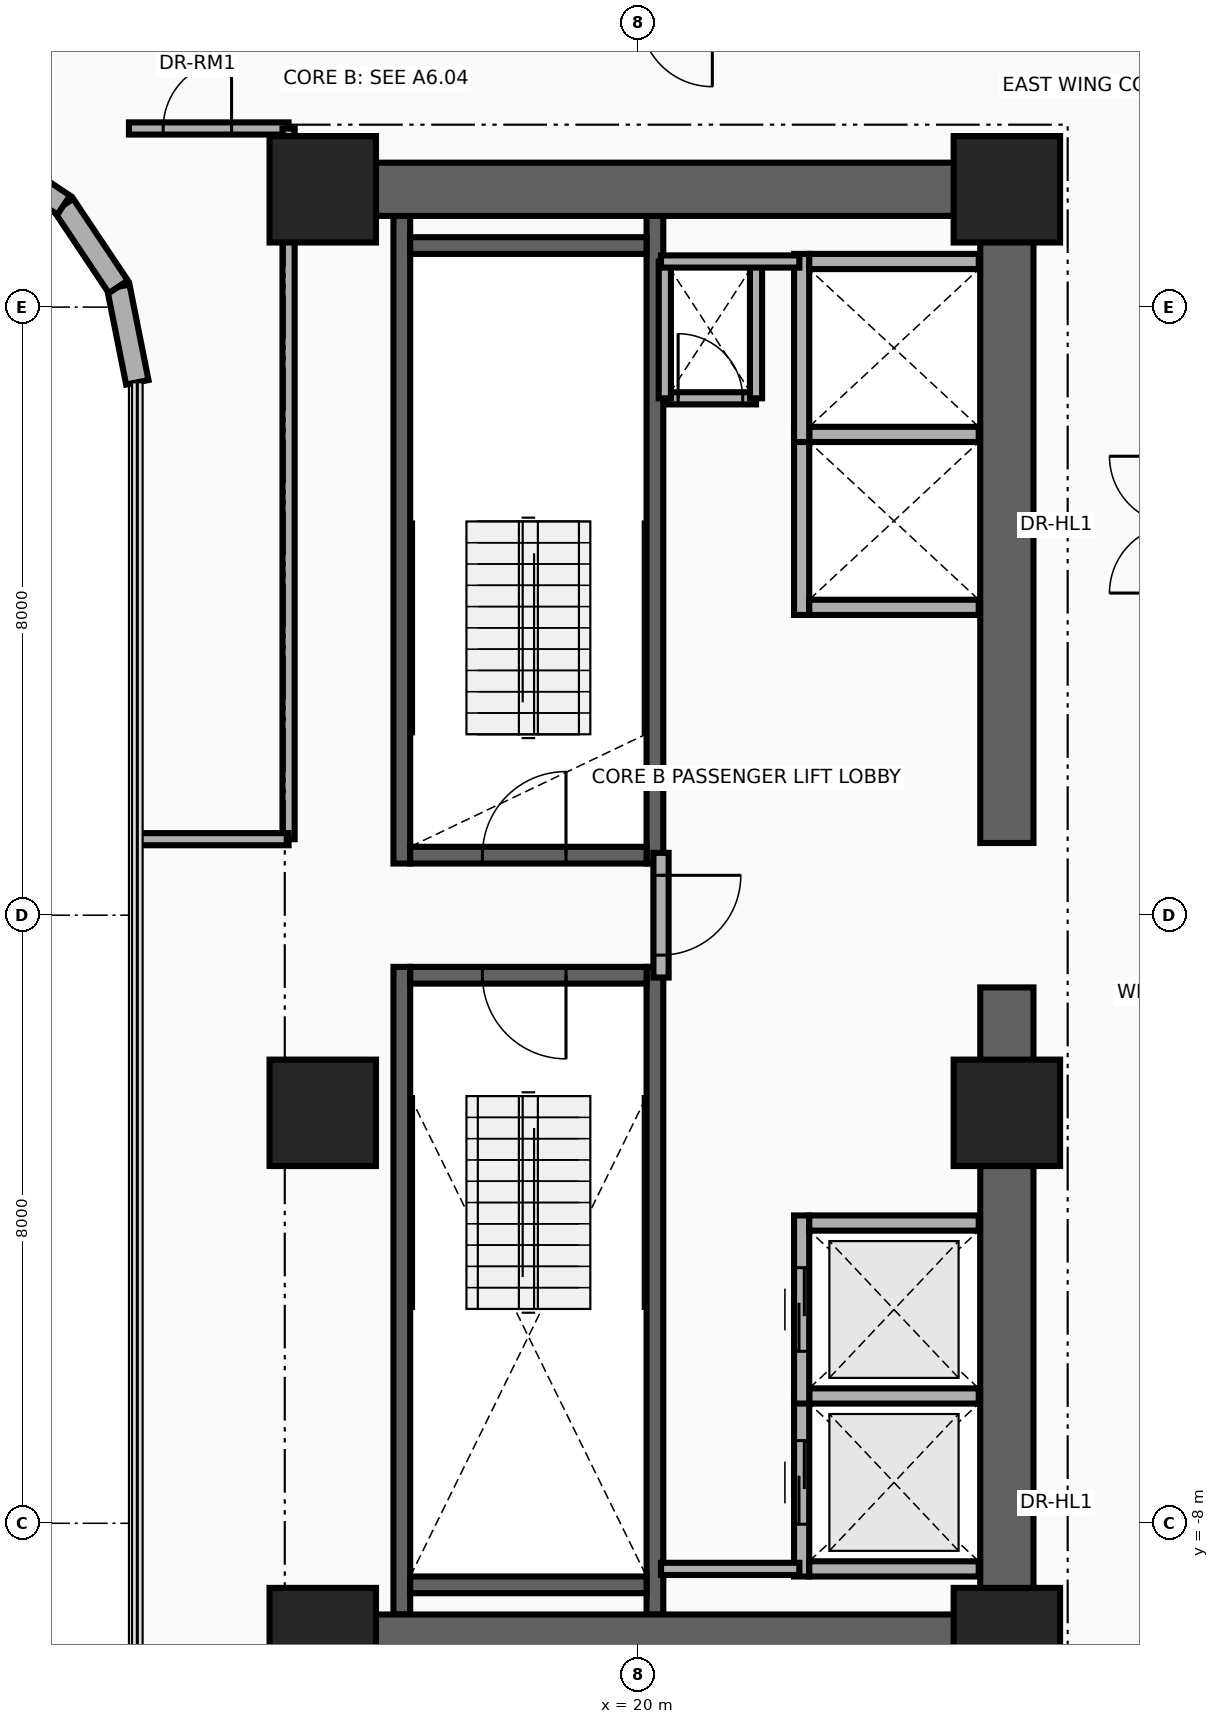
"""IFC4 building model, lengths in metres.
Left out: names, types, materials, properties, quantities, classifications, styles, units other than length and angle.
Written with IfcOpenShell. Run it as: python <this file> out.ifc"""

import sys

from ifc_helpers import new_model, si_unit, direction, frame, frame_2d, origin, origin_2d, place, context, subcontext, project, spatial, rectangle, extrude, source, transform, mapped, element, fill, save


model = new_model("IFC4")
c1 = context("Model", 3, precision=1e-05, world=origin(), true_north=direction((0.0, 1.0)))
c2 = subcontext(c1, "Body", "Model", "MODEL_VIEW")
j1 = project(units=[si_unit("LENGTHUNIT", "METRE"), si_unit("PLANEANGLEUNIT", "RADIAN")], contexts=[c1])
p1 = place(None, origin())
s1 = spatial("IfcSite", under=j1, at=p1, CompositionType="ELEMENT")
p2 = place(p1, origin())
s2 = spatial("IfcBuilding", under=s1, at=p2, CompositionType="ELEMENT")
p3 = place(p2, frame((0.0, 0.0, 92.6)))
s3 = spatial("IfcBuildingStorey", under=s2, at=p3, CompositionType="ELEMENT", Elevation=92.6)
for number, where, z_axis, x_axis in (
    (1, (16.89, 0.68, 0.0), (0.0, 0.0, 1.0), (0.0, 1.0, 0.0)),
    (2, (20.22, 0.68, 0.0), (0.0, 0.0, 1.0), (0.0, 1.0, 0.0)),
):
    element("IfcWall", number, at=place(p3, frame(where, z_axis=z_axis, x_axis=x_axis)), inside=s3, PredefinedType="SHEAR", context=c2, shape_type="SweptSolid", body=[
        extrude(rectangle(XDim=8.52, YDim=0.22, at=frame_2d((4.26, 0.0))), origin(), (0.0, 0.0, 1.0), 3.46),
    ])
p4 = place(p3, frame((17.0, 0.79, 0.0), z_axis=(0.0, 0.0, 1.0), x_axis=(1.0, 0.0, 0.0)))
e3 = element("IfcWall", 3, at=p4, inside=s3, PredefinedType="SHEAR", context=c2, shape_type="SweptSolid", body=[
    extrude(rectangle(XDim=3.11, YDim=0.22, at=frame_2d((1.555, 0.0))), origin(), (0.0, 0.0, 1.0), 3.46),
])
p5 = place(p4, frame((0.95, 0.0, 0.0)))
e4 = element("IfcOpeningElement", 4, at=p5, cuts=e3, PredefinedType="OPENING", context=c2, shape_type="SweptSolid", body=[
    extrude(rectangle(XDim=1.1, YDim=2.15, at=frame_2d((0.55, 1.075))), frame((0.0, 0.125, 0.0), z_axis=(0.0, -1.0, 0.0), x_axis=(1.0, 0.0, 0.0)), (0.0, 0.0, 1.0), 0.25),
])
p6 = place(p3, frame((17.0, 8.81, 0.0), z_axis=(0.0, 0.0, 1.0), x_axis=(1.0, 0.0, 0.0)))
e5 = element("IfcWall", 5, at=p6, inside=s3, PredefinedType="SHEAR", context=c2, shape_type="SweptSolid", body=[
    extrude(rectangle(XDim=3.11, YDim=0.22, at=frame_2d((1.555, 0.0))), origin(), (0.0, 0.0, 1.0), 3.46),
])
for number, where, z_axis, x_axis in (
    (6, (16.89, -9.2, 0.0), (0.0, 0.0, 1.0), (0.0, 1.0, 0.0)),
    (7, (20.22, -9.2, 0.0), (0.0, 0.0, 1.0), (0.0, 1.0, 0.0)),
):
    element("IfcWall", number, at=place(p3, frame(where, z_axis=z_axis, x_axis=x_axis)), inside=s3, PredefinedType="SHEAR", context=c2, shape_type="SweptSolid", body=[
        extrude(rectangle(XDim=8.52, YDim=0.22, at=frame_2d((4.26, 0.0))), origin(), (0.0, 0.0, 1.0), 3.46),
    ])
p7 = place(p3, frame((17.0, -8.81, 0.0), z_axis=(0.0, 0.0, 1.0), x_axis=(1.0, 0.0, 0.0)))
e8 = element("IfcWall", 8, at=p7, inside=s3, PredefinedType="SHEAR", context=c2, shape_type="SweptSolid", body=[
    extrude(rectangle(XDim=3.11, YDim=0.22, at=frame_2d((1.555, 0.0))), origin(), (0.0, 0.0, 1.0), 3.46),
])
p8 = place(p3, frame((17.0, -0.79, 0.0), z_axis=(0.0, 0.0, 1.0), x_axis=(1.0, 0.0, 0.0)))
e9 = element("IfcWall", 9, at=p8, inside=s3, PredefinedType="SHEAR", context=c2, shape_type="SweptSolid", body=[
    extrude(rectangle(XDim=3.11, YDim=0.22, at=frame_2d((1.555, 0.0))), origin(), (0.0, 0.0, 1.0), 3.46),
])
p9 = place(p8, frame((0.95, 0.0, 0.0)))
e10 = element("IfcOpeningElement", 10, at=p9, cuts=e9, PredefinedType="OPENING", context=c2, shape_type="SweptSolid", body=[
    extrude(rectangle(XDim=1.1, YDim=2.15, at=frame_2d((0.55, 1.075))), frame((0.0, 0.125, 0.0), z_axis=(0.0, -1.0, 0.0), x_axis=(1.0, 0.0, 0.0)), (0.0, 0.0, 1.0), 0.25),
])
for number, where, z_axis, x_axis in (
    (11, (24.85, -9.9, 0.0), (0.0, 0.0, 1.0), (0.0, 1.0, 0.0)),
    (12, (24.85, 0.95, 0.0), (0.0, 0.0, 1.0), (0.0, 1.0, 0.0)),
):
    element("IfcWall", number, at=place(p3, frame(where, z_axis=z_axis, x_axis=x_axis)), inside=s3, PredefinedType="SHEAR", context=c2, shape_type="SweptSolid", body=[
        extrude(rectangle(XDim=8.95, YDim=0.7, at=frame_2d((4.475, 0.0))), origin(), (0.0, 0.0, 1.0), 3.46),
    ])
for number, where, z_axis, x_axis in (
    (13, (15.85, 9.55, 0.0), (0.0, 0.0, 1.0), (1.0, 0.0, 0.0)),
    (14, (15.85, -9.55, 0.0), (0.0, 0.0, 1.0), (1.0, 0.0, 0.0)),
):
    element("IfcWall", number, at=place(p3, frame(where, z_axis=z_axis, x_axis=x_axis)), inside=s3, PredefinedType="SHEAR", context=c2, shape_type="SweptSolid", body=[
        extrude(rectangle(XDim=9.0, YDim=0.7, at=frame_2d((4.5, 0.0))), origin(), (0.0, 0.0, 1.0), 3.46),
    ])
m1 = source(origin(), c2, "Body", "SweptSolid", [
    extrude(rectangle(XDim=1.4, YDim=1.4, at=origin_2d()), origin(), (0.0, 0.0, 1.0), 3.7),
])
for number, where, z_axis, x_axis in (
    (15, (15.85, -9.55, 0.0), (0.0, 0.0, 1.0), (1.0, 0.0, 0.0)),
    (16, (24.85, -9.55, 0.0), (0.0, 0.0, 1.0), (1.0, 0.0, 0.0)),
    (17, (15.85, -2.6, 0.0), (0.0, 0.0, 1.0), (1.0, 0.0, 0.0)),
    (18, (24.85, -2.6, 0.0), (0.0, 0.0, 1.0), (1.0, 0.0, 0.0)),
    (19, (15.85, 9.55, 0.0), (0.0, 0.0, 1.0), (1.0, 0.0, 0.0)),
    (20, (24.85, 9.55, 0.0), (0.0, 0.0, 1.0), (1.0, 0.0, 0.0)),
):
    element("IfcColumn", number, at=place(p3, frame(where, z_axis=z_axis, x_axis=x_axis)), inside=s3, PredefinedType="COLUMN", context=c2, shape_type="MappedRepresentation", body=[
        mapped(m1, transform((0.0, 0.0, 0.0), x_axis=(1.0, 0.0, 0.0), y_axis=(0.0, 1.0, 0.0), z_axis=(0.0, 0.0, 1.0), scale=1.0)),
    ])
p10 = place(p3, frame((13.41, 7.011, 0.0), z_axis=(0.0, 0.0, 1.0), x_axis=(-0.195090163074, 0.980785312019, 0.0)))
e21 = element("IfcWall", 21, at=p10, inside=s3, PredefinedType="SOLIDWALL", context=c2, shape_type="SweptSolid", body=[
    extrude(rectangle(XDim=1.281, YDim=0.3, at=frame_2d((0.641, 0.0))), origin(), (0.0, 0.0, 1.0), 3.46),
])
for number, where, z_axis, x_axis in (
    (22, (13.16, 8.268, 0.0), (0.0, 0.0, 1.0), (-0.556, 0.831, 0.0)),
    (23, (12.442, 9.342, 0.0), (0.0, 0.0, 1.0), (-0.831, 0.556, 0.0)),
):
    element("IfcWall", number, at=place(p3, frame(where, z_axis=z_axis, x_axis=x_axis)), inside=s3, PredefinedType="SOLIDWALL", context=c2, shape_type="SweptSolid", body=[
        extrude(rectangle(XDim=1.292, YDim=0.3, at=frame_2d((0.646, 0.0))), origin(), (0.0, 0.0, 1.0), 3.46),
    ])
p11 = place(p3, frame((22.15, -8.7, 0.0), z_axis=(0.0, 0.0, 1.0), x_axis=(0.0, 1.0, 0.0)))
e24 = element("IfcWall", 24, at=p11, inside=s3, PredefinedType="MOVABLE", context=c2, shape_type="SweptSolid", body=[
    extrude(rectangle(XDim=2.475, YDim=0.2, at=frame_2d((1.237, 0.0))), origin(), (0.0, 0.0, 1.0), 3.46),
])
p12 = place(p11, frame((0.688, 0.0, 0.0)))
e25 = element("IfcOpeningElement", 25, at=p12, cuts=e24, PredefinedType="OPENING", context=c2, shape_type="SweptSolid", body=[
    extrude(rectangle(XDim=1.1, YDim=2.1, at=frame_2d((0.55, 1.05))), frame((0.0, 0.115, 0.0), z_axis=(0.0, -1.0, 0.0), x_axis=(1.0, 0.0, 0.0)), (0.0, 0.0, 1.0), 0.23),
])
for number, where, z_axis, x_axis in (
    (26, (22.25, -8.6, 0.0), (0.0, 0.0, 1.0), (1.0, 0.0, 0.0)),
    (27, (22.25, -6.325, 0.0), (0.0, 0.0, 1.0), (1.0, 0.0, 0.0)),
):
    element("IfcWall", number, at=place(p3, frame(where, z_axis=z_axis, x_axis=x_axis)), inside=s3, PredefinedType="MOVABLE", context=c2, shape_type="SweptSolid", body=[
        extrude(rectangle(XDim=2.23, YDim=0.2, at=frame_2d((1.115, 0.0))), origin(), (0.0, 0.0, 1.0), 3.46),
    ])
p13 = place(p3, frame((22.15, -6.425, 0.0), z_axis=(0.0, 0.0, 1.0), x_axis=(0.0, 1.0, 0.0)))
e28 = element("IfcWall", 28, at=p13, inside=s3, PredefinedType="MOVABLE", context=c2, shape_type="SweptSolid", body=[
    extrude(rectangle(XDim=2.475, YDim=0.2, at=frame_2d((1.238, 0.0))), origin(), (0.0, 0.0, 1.0), 3.46),
])
p14 = place(p13, frame((0.688, 0.0, 0.0)))
e29 = element("IfcOpeningElement", 29, at=p14, cuts=e28, PredefinedType="OPENING", context=c2, shape_type="SweptSolid", body=[
    extrude(rectangle(XDim=1.1, YDim=2.1, at=frame_2d((0.55, 1.05))), frame((0.0, 0.115, 0.0), z_axis=(0.0, -1.0, 0.0), x_axis=(1.0, 0.0, 0.0)), (0.0, 0.0, 1.0), 0.23),
])
p15 = place(p3, frame((22.25, -4.05, 0.0), z_axis=(0.0, 0.0, 1.0), x_axis=(1.0, 0.0, 0.0)))
e30 = element("IfcWall", 30, at=p15, inside=s3, PredefinedType="MOVABLE", context=c2, shape_type="SweptSolid", body=[
    extrude(rectangle(XDim=2.23, YDim=0.2, at=frame_2d((1.115, 0.0))), origin(), (0.0, 0.0, 1.0), 3.46),
])
p16 = place(p3, frame((22.15, 3.95, 0.0), z_axis=(0.0, 0.0, 1.0), x_axis=(0.0, 1.0, 0.0)))
e31 = element("IfcWall", 31, at=p16, inside=s3, PredefinedType="MOVABLE", context=c2, shape_type="SweptSolid", body=[
    extrude(rectangle(XDim=2.475, YDim=0.2, at=frame_2d((1.238, 0.0))), origin(), (0.0, 0.0, 1.0), 3.46),
])
for number, where, z_axis, x_axis in (
    (32, (22.25, 4.05, 0.0), (0.0, 0.0, 1.0), (1.0, 0.0, 0.0)),
    (33, (22.25, 6.325, 0.0), (0.0, 0.0, 1.0), (1.0, 0.0, 0.0)),
):
    element("IfcWall", number, at=place(p3, frame(where, z_axis=z_axis, x_axis=x_axis)), inside=s3, PredefinedType="MOVABLE", context=c2, shape_type="SweptSolid", body=[
        extrude(rectangle(XDim=2.23, YDim=0.2, at=frame_2d((1.115, 0.0))), origin(), (0.0, 0.0, 1.0), 2.245),
    ])
p17 = place(p3, frame((22.15, 6.225, 0.0), z_axis=(0.0, 0.0, 1.0), x_axis=(0.0, 1.0, 0.0)))
e34 = element("IfcWall", 34, at=p17, inside=s3, PredefinedType="MOVABLE", context=c2, shape_type="SweptSolid", body=[
    extrude(rectangle(XDim=2.475, YDim=0.2, at=frame_2d((1.237, 0.0))), origin(), (0.0, 0.0, 1.0), 3.46),
])
p18 = place(p3, frame((22.25, 8.6, 0.0), z_axis=(0.0, 0.0, 1.0), x_axis=(1.0, 0.0, 0.0)))
e35 = element("IfcWall", 35, at=p18, inside=s3, PredefinedType="MOVABLE", context=c2, shape_type="SweptSolid", body=[
    extrude(rectangle(XDim=2.23, YDim=0.2, at=frame_2d((1.115, 0.0))), origin(), (0.0, 0.0, 1.0), 2.245),
])
p19 = place(p3, frame((20.3, -0.82, 0.0), z_axis=(0.0, 0.0, 1.0), x_axis=(0.0, 1.0, 0.0)))
e36 = element("IfcWall", 36, at=p19, inside=s3, PredefinedType="PARTITIONING", context=c2, shape_type="SweptSolid", body=[
    extrude(rectangle(XDim=1.64, YDim=0.2, at=frame_2d((0.82, 0.0))), origin(), (0.0, 0.0, 1.0), 3.46),
])
p20 = place(p19, frame((0.295, 0.0, 0.0)))
e37 = element("IfcOpeningElement", 37, at=p20, cuts=e36, PredefinedType="OPENING", context=c2, shape_type="SweptSolid", body=[
    extrude(rectangle(XDim=1.05, YDim=2.15, at=frame_2d((0.525, 1.075))), frame((0.0, 0.115, 0.0), z_axis=(0.0, -1.0, 0.0), x_axis=(1.0, 0.0, 0.0)), (0.0, 0.0, 1.0), 0.23),
])
p21 = place(p3, frame((20.35, 6.8, 0.0), z_axis=(0.0, 0.0, 1.0), x_axis=(1.0, 0.0, 0.0)))
e38 = element("IfcWall", 38, at=p21, inside=s3, PredefinedType="PARTITIONING", context=c2, shape_type="SweptSolid", body=[
    extrude(rectangle(XDim=1.2, YDim=0.16, at=frame_2d((0.6, 0.0))), origin(), (0.0, 0.0, 1.0), 3.46),
])
p22 = place(p21, frame((0.175, 0.0, 0.0)))
e39 = element("IfcOpeningElement", 39, at=p22, cuts=e38, PredefinedType="OPENING", context=c2, shape_type="SweptSolid", body=[
    extrude(rectangle(XDim=0.85, YDim=2.05, at=frame_2d((0.425, 1.025))), frame((0.0, 0.095, 0.0), z_axis=(0.0, -1.0, 0.0), x_axis=(1.0, 0.0, 0.0)), (0.0, 0.0, 1.0), 0.19),
])
for number, where, z_axis, x_axis in (
    (40, (21.55, 6.8, 0.0), (0.0, 0.0, 1.0), (0.0, 1.0, 0.0)),
    (41, (20.35, 6.8, 0.0), (0.0, 0.0, 1.0), (0.0, 1.0, 0.0)),
):
    element("IfcWall", number, at=place(p3, frame(where, z_axis=z_axis, x_axis=x_axis)), inside=s3, PredefinedType="PARTITIONING", context=c2, shape_type="SweptSolid", body=[
        extrude(rectangle(XDim=1.8, YDim=0.16, at=frame_2d((0.9, 0.0))), origin(), (0.0, 0.0, 1.0), 3.46),
    ])
for number, where, z_axis, x_axis in (
    (42, (20.3, -8.6, 0.0), (0.0, 0.0, 1.0), (1.0, 0.0, 0.0)),
    (43, (20.3, 8.6, 0.0), (0.0, 0.0, 1.0), (1.0, 0.0, 0.0)),
):
    element("IfcWall", number, at=place(p3, frame(where, z_axis=z_axis, x_axis=x_axis)), inside=s3, PredefinedType="PARTITIONING", context=c2, shape_type="SweptSolid", body=[
        extrude(rectangle(XDim=1.82, YDim=0.16, at=frame_2d((0.91, 0.0))), origin(), (0.0, 0.0, 1.0), 3.46),
    ])
p23 = place(p3, frame((13.3, 10.35, 0.0), z_axis=(0.0, 0.0, 1.0), x_axis=(1.0, 0.0, 0.0)))
e44 = element("IfcWall", 44, at=p23, inside=s3, PredefinedType="PARTITIONING", context=c2, shape_type="SweptSolid", body=[
    extrude(rectangle(XDim=2.1, YDim=0.16, at=frame_2d((1.05, 0.0))), origin(), (0.0, 0.0, 1.0), 2.583),
])
p24 = place(p23, frame((0.45, 0.0, 0.0)))
e45 = element("IfcOpeningElement", 45, at=p24, cuts=e44, PredefinedType="OPENING", context=c2, shape_type="SweptSolid", body=[
    extrude(rectangle(XDim=0.9, YDim=2.1, at=frame_2d((0.45, 1.05))), frame((0.0, 0.095, 0.0), z_axis=(0.0, -1.0, 0.0), x_axis=(1.0, 0.0, 0.0)), (0.0, 0.0, 1.0), 0.19),
])
p25 = place(p3, frame((15.4, 1.0, 0.0), z_axis=(0.0, 0.0, 1.0), x_axis=(0.0, 1.0, 0.0)))
e46 = element("IfcWall", 46, at=p25, inside=s3, PredefinedType="PARTITIONING", context=c2, shape_type="SweptSolid", body=[
    extrude(rectangle(XDim=9.35, YDim=0.16, at=frame_2d((4.675, 0.0))), origin(), (0.0, 0.0, 1.0), 2.245),
])
p26 = place(p3, frame((13.41, 1.0, 0.0), z_axis=(0.0, 0.0, 1.0), x_axis=(1.0, 0.0, 0.0)))
e47 = element("IfcWall", 47, at=p26, inside=s3, PredefinedType="PARTITIONING", context=c2, shape_type="SweptSolid", body=[
    extrude(rectangle(XDim=1.99, YDim=0.16, at=frame_2d((0.995, 0.0))), origin(), (0.0, 0.0, 1.0), 2.245),
])
p27 = place(p12, origin())
e48 = element("IfcDoor", 48, at=p27, inside=s3, OperationType="DOUBLE_DOOR_SLIDING", PredefinedType="DOOR", context=c2, shape_type="SweptSolid", body=[
    extrude(rectangle(XDim=1.1, YDim=2.1, at=frame_2d((0.55, 1.05))), frame((0.0, 0.025, 0.0), z_axis=(0.0, -1.0, 0.0), x_axis=(1.0, 0.0, 0.0)), (0.0, 0.0, 1.0), 0.05),
])
fill(e25, e48)
p28 = place(p14, origin())
e49 = element("IfcDoor", 49, at=p28, inside=s3, OperationType="DOUBLE_DOOR_SLIDING", PredefinedType="DOOR", context=c2, shape_type="SweptSolid", body=[
    extrude(rectangle(XDim=1.1, YDim=2.1, at=frame_2d((0.55, 1.05))), frame((0.0, 0.025, 0.0), z_axis=(0.0, -1.0, 0.0), x_axis=(1.0, 0.0, 0.0)), (0.0, 0.0, 1.0), 0.05),
])
fill(e29, e49)
p29 = place(p20, frame((1.05, 0.0, 0.0), z_axis=(0.0, 0.0, 1.0), x_axis=(-1.0, 0.0, 0.0)))
e50 = element("IfcDoor", 50, at=p29, inside=s3, OperationType="SINGLE_SWING_LEFT", PredefinedType="DOOR", context=c2, shape_type="SweptSolid", body=[
    extrude(rectangle(XDim=1.05, YDim=2.15, at=frame_2d((0.525, 1.075))), frame((0.0, 0.025, 0.0), z_axis=(0.0, -1.0, 0.0), x_axis=(1.0, 0.0, 0.0)), (0.0, 0.0, 1.0), 0.05),
])
fill(e37, e50)
p30 = place(p5, origin())
e51 = element("IfcDoor", 51, at=p30, inside=s3, OperationType="SINGLE_SWING_RIGHT", PredefinedType="DOOR", context=c2, shape_type="SweptSolid", body=[
    extrude(rectangle(XDim=1.1, YDim=2.15, at=frame_2d((0.55, 1.075))), frame((0.0, 0.025, 0.0), z_axis=(0.0, -1.0, 0.0), x_axis=(1.0, 0.0, 0.0)), (0.0, 0.0, 1.0), 0.05),
])
fill(e4, e51)
p31 = place(p9, frame((1.1, 0.0, 0.0), z_axis=(0.0, 0.0, 1.0), x_axis=(-1.0, 0.0, 0.0)))
e52 = element("IfcDoor", 52, at=p31, inside=s3, OperationType="SINGLE_SWING_LEFT", PredefinedType="DOOR", context=c2, shape_type="SweptSolid", body=[
    extrude(rectangle(XDim=1.1, YDim=2.15, at=frame_2d((0.55, 1.075))), frame((0.0, 0.025, 0.0), z_axis=(0.0, -1.0, 0.0), x_axis=(1.0, 0.0, 0.0)), (0.0, 0.0, 1.0), 0.05),
])
fill(e10, e52)
p32 = place(p22, origin())
e53 = element("IfcDoor", 53, at=p32, inside=s3, OperationType="SINGLE_SWING_RIGHT", PredefinedType="DOOR", context=c2, shape_type="SweptSolid", body=[
    extrude(rectangle(XDim=0.85, YDim=2.05, at=frame_2d((0.425, 1.025))), frame((0.0, 0.025, 0.0), z_axis=(0.0, -1.0, 0.0), x_axis=(1.0, 0.0, 0.0)), (0.0, 0.0, 1.0), 0.05),
])
fill(e39, e53)
p33 = place(p24, origin())
e54 = element("IfcDoor", 54, at=p33, inside=s3, OperationType="SINGLE_SWING_LEFT", PredefinedType="DOOR", context=c2, shape_type="SweptSolid", body=[
    extrude(rectangle(XDim=0.9, YDim=2.1, at=frame_2d((0.45, 1.05))), frame((0.0, 0.025, 0.0), z_axis=(0.0, -1.0, 0.0), x_axis=(1.0, 0.0, 0.0)), (0.0, 0.0, 1.0), 0.05),
])
fill(e45, e54)
save(model, sys.argv[1])
